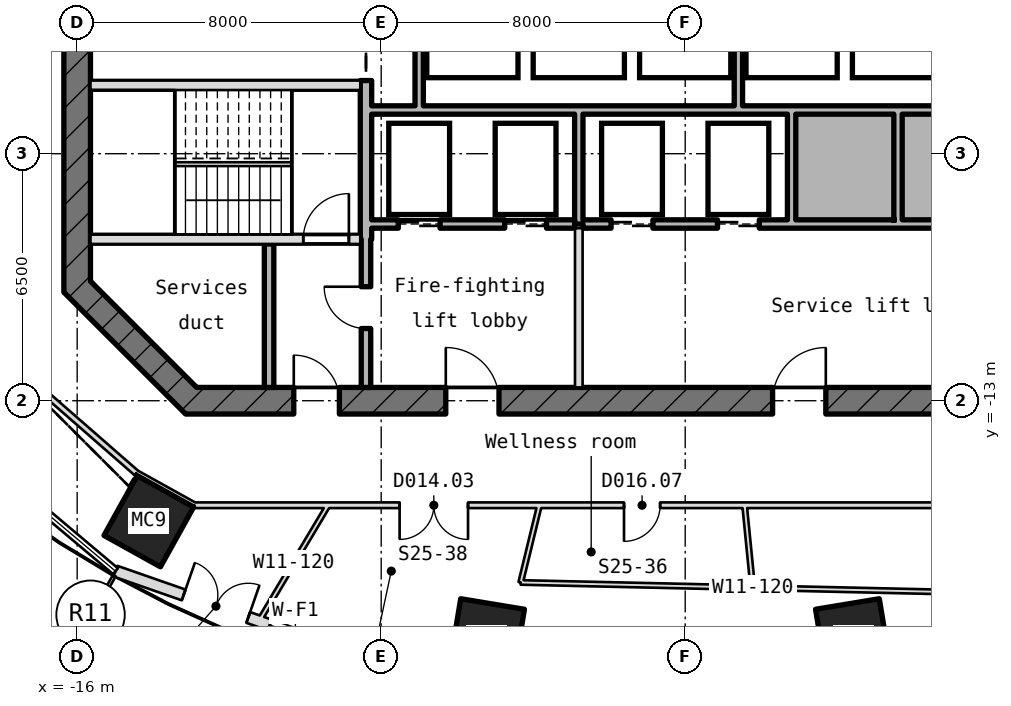
"""IFC4 building model, lengths in metres.
Left out: names, types, materials, properties, quantities, classifications, styles, units other than length and angle.
Written with IfcOpenShell. Run it as: python <this file> out.ifc"""

import sys

from ifc_helpers import new_model, si_unit, direction, frame, frame_2d, origin, origin_2d, place, context, subcontext, project, spatial, rectangle, hollow_rectangle, extrude, element, fill, save


model = new_model("IFC4")
c1 = context("Model", 3, precision=1e-05, world=origin(), true_north=direction((0.0, 1.0)))
c2 = subcontext(c1, "Body", "Model", "MODEL_VIEW")
j1 = project(units=[si_unit("LENGTHUNIT", "METRE"), si_unit("PLANEANGLEUNIT", "RADIAN")], contexts=[c1])
p1 = place(None, origin())
s1 = spatial("IfcSite", under=j1, at=p1, CompositionType="ELEMENT")
p2 = place(p1, origin())
s2 = spatial("IfcBuilding", under=s1, at=p2, CompositionType="ELEMENT")
p3 = place(p2, frame((0.0, 0.0, 359.2)))
s3 = spatial("IfcBuildingStorey", under=s2, at=p3, CompositionType="ELEMENT", Elevation=359.2)
for number, where, z_axis, x_axis in (
    (1, (-14.114, -16.171, -0.18), (0.0, 0.0, 1.0), (-0.874, 0.486, 0.0)),
    (2, (-5.216, -19.237, -0.18), (0.0, 0.0, 1.0), (-0.987, 0.163, 0.0)),
    (3, (4.416, -19.237, -0.18), (0.0, 0.0, 1.0), (-0.987, -0.163, 0.0)),
):
    element("IfcColumn", number, at=place(p3, frame(where, z_axis=z_axis, x_axis=x_axis)), inside=s3, PredefinedType="COLUMN", context=c2, shape_type="SweptSolid", body=[
        extrude(hollow_rectangle(XDim=1.7, YDim=1.8, WallThickness=0.05, at=origin_2d()), origin(), (0.0, 0.0, 1.0), 4.15),
    ])
p4 = place(p3, frame((-14.992, -17.485, 0.0), z_axis=(0.0, 0.0, 1.0), x_axis=(0.944242611416, -0.329250498535, 0.0)))
e4 = element("IfcWall", 4, at=p4, inside=s3, PredefinedType="SOLIDWALL", context=c2, shape_type="SweptSolid", body=[
    extrude(rectangle(XDim=10.027, YDim=0.3, at=frame_2d((5.014, 0.0))), origin(), (0.0, 0.0, 1.0), 3.97),
])
p5 = place(p4, frame((1.9, 0.0, 0.0)))
e5 = element("IfcOpeningElement", 5, at=p5, cuts=e4, PredefinedType="OPENING", context=c2, shape_type="SweptSolid", body=[
    extrude(rectangle(XDim=1.8, YDim=2.4, at=frame_2d((0.9, 1.2))), frame((0.0, 0.16, 0.0), z_axis=(0.0, -1.0, 0.0), x_axis=(1.0, 0.0, 0.0)), (0.0, 0.0, 1.0), 0.32),
])
p6 = place(p4, frame((4.3, 0.0, 0.9)))
e6 = element("IfcOpeningElement", 6, at=p6, cuts=e4, PredefinedType="OPENING", context=c2, shape_type="SweptSolid", body=[
    extrude(rectangle(XDim=1.6, YDim=1.5, at=frame_2d((0.8, 0.75))), frame((0.0, 0.16, 0.0), z_axis=(0.0, -1.0, 0.0), x_axis=(1.0, 0.0, 0.0)), (0.0, 0.0, 1.0), 0.32),
])
p7 = place(p3, frame((4.724, -20.786, 0.0), z_axis=(0.0, 0.0, 1.0), x_axis=(0.944239971919, 0.329258068133, 0.0)))
e7 = element("IfcWall", 7, at=p7, inside=s3, PredefinedType="SOLIDWALL", context=c2, shape_type="SweptSolid", body=[
    extrude(rectangle(XDim=10.027, YDim=0.3, at=frame_2d((5.014, 0.0))), origin(), (0.0, 0.0, 1.0), 3.97),
])
p8 = place(p7, frame((1.9, 0.0, 0.0)))
e8 = element("IfcOpeningElement", 8, at=p8, cuts=e7, PredefinedType="OPENING", context=c2, shape_type="SweptSolid", body=[
    extrude(rectangle(XDim=1.8, YDim=2.4, at=frame_2d((0.9, 1.2))), frame((0.0, 0.16, 0.0), z_axis=(0.0, -1.0, 0.0), x_axis=(1.0, 0.0, 0.0)), (0.0, 0.0, 1.0), 0.32),
])
p9 = place(p7, frame((4.3, 0.0, 0.9)))
e9 = element("IfcOpeningElement", 9, at=p9, cuts=e7, PredefinedType="OPENING", context=c2, shape_type="SweptSolid", body=[
    extrude(rectangle(XDim=1.6, YDim=1.5, at=frame_2d((0.8, 0.75))), frame((0.0, 0.16, 0.0), z_axis=(0.0, -1.0, 0.0), x_axis=(1.0, 0.0, 0.0)), (0.0, 0.0, 1.0), 0.32),
])
p10 = place(p3, frame((-16.0, 10.145, -0.18), z_axis=(0.0, 0.0, 1.0), x_axis=(0.0, -1.0, 0.0)))
e10 = element("IfcWall", 10, at=p10, inside=s3, PredefinedType="SHEAR", context=c2, shape_type="SweptSolid", body=[
    extrude(rectangle(XDim=20.29, YDim=0.7, at=frame_2d((10.145, 0.0))), origin(), (0.0, 0.0, 1.0), 4.15),
])
p11 = place(p10, frame((8.945, 0.0, 0.18)))
e11 = element("IfcOpeningElement", 11, at=p11, cuts=e10, PredefinedType="OPENING", context=c2, shape_type="SweptSolid", body=[
    extrude(rectangle(XDim=2.4, YDim=2.1, at=frame_2d((1.2, 1.05))), frame((0.0, 0.36, 0.0), z_axis=(0.0, -1.0, 0.0), x_axis=(1.0, 0.0, 0.0)), (0.0, 0.0, 1.0), 0.72),
])
p12 = place(p10, frame((5.545, 0.0, 0.18)))
e12 = element("IfcOpeningElement", 12, at=p12, cuts=e10, PredefinedType="OPENING", context=c2, shape_type="SweptSolid", body=[
    extrude(rectangle(XDim=1.2, YDim=2.1, at=frame_2d((0.6, 1.05))), frame((0.0, 0.36, 0.0), z_axis=(0.0, -1.0, 0.0), x_axis=(1.0, 0.0, 0.0)), (0.0, 0.0, 1.0), 0.72),
])
p13 = place(p3, frame((-16.103, -9.897, -0.18), z_axis=(0.0, 0.0, 1.0), x_axis=(0.707106781187, -0.707106781187, 0.0)))
e13 = element("IfcWall", 13, at=p13, inside=s3, PredefinedType="SHEAR", context=c2, shape_type="SweptSolid", body=[
    extrude(rectangle(XDim=4.533, YDim=0.7, at=frame_2d((2.266, 0.0))), origin(), (0.0, 0.0, 1.0), 4.15),
])
p14 = place(p3, frame((-13.145, -13.0, -0.18), z_axis=(0.0, 0.0, 1.0), x_axis=(1.0, 0.0, 0.0)))
e14 = element("IfcWall", 14, at=p14, inside=s3, PredefinedType="SHEAR", context=c2, shape_type="SweptSolid", body=[
    extrude(rectangle(XDim=26.29, YDim=0.7, at=frame_2d((13.145, 0.0))), origin(), (0.0, 0.0, 1.0), 4.15),
])
p15 = place(p14, frame((2.845, 0.0, 0.18)))
e15 = element("IfcOpeningElement", 15, at=p15, cuts=e14, PredefinedType="OPENING", context=c2, shape_type="SweptSolid", body=[
    extrude(rectangle(XDim=1.2, YDim=2.1, at=frame_2d((0.6, 1.05))), frame((0.0, 0.36, 0.0), z_axis=(0.0, -1.0, 0.0), x_axis=(1.0, 0.0, 0.0)), (0.0, 0.0, 1.0), 0.72),
])
p16 = place(p14, frame((6.845, 0.0, 0.18)))
e16 = element("IfcOpeningElement", 16, at=p16, cuts=e14, PredefinedType="OPENING", context=c2, shape_type="SweptSolid", body=[
    extrude(rectangle(XDim=1.4, YDim=2.1, at=frame_2d((0.7, 1.05))), frame((0.0, 0.36, 0.0), z_axis=(0.0, -1.0, 0.0), x_axis=(1.0, 0.0, 0.0)), (0.0, 0.0, 1.0), 0.72),
])
p17 = place(p14, frame((15.445, 0.0, 0.18)))
e17 = element("IfcOpeningElement", 17, at=p17, cuts=e14, PredefinedType="OPENING", context=c2, shape_type="SweptSolid", body=[
    extrude(rectangle(XDim=1.4, YDim=2.1, at=frame_2d((0.7, 1.05))), frame((0.0, 0.36, 0.0), z_axis=(0.0, -1.0, 0.0), x_axis=(1.0, 0.0, 0.0)), (0.0, 0.0, 1.0), 0.72),
])
p18 = place(p3, frame((-15.65, -8.75, -0.18), z_axis=(0.0, 0.0, 1.0), x_axis=(1.0, 0.0, 0.0)))
e18 = element("IfcWall", 18, at=p18, inside=s3, PredefinedType="SHEAR", context=c2, shape_type="SweptSolid", body=[
    extrude(rectangle(XDim=7.1, YDim=0.25, at=frame_2d((3.55, 0.0))), origin(), (0.0, 0.0, 1.0), 4.15),
])
p19 = place(p18, frame((5.6, 0.0, 0.18)))
e19 = element("IfcOpeningElement", 19, at=p19, cuts=e18, PredefinedType="OPENING", context=c2, shape_type="SweptSolid", body=[
    extrude(rectangle(XDim=1.2, YDim=2.1, at=frame_2d((0.6, 1.05))), frame((0.0, 0.135, 0.0), z_axis=(0.0, -1.0, 0.0), x_axis=(1.0, 0.0, 0.0)), (0.0, 0.0, 1.0), 0.27),
])
p20 = place(p3, frame((-8.25, -8.35, 0.0), z_axis=(0.0, 0.0, 1.0), x_axis=(1.0, 0.0, 0.0)))
e20 = element("IfcWall", 20, at=p20, inside=s3, PredefinedType="STANDARD", context=c2, shape_type="SweptSolid", body=[
    extrude(rectangle(XDim=5.34, YDim=0.22, at=frame_2d((2.67, 0.0))), origin(), (0.0, 0.0, 1.0), 3.97),
])
p21 = place(p20, frame((0.7, 0.0, 0.0)))
e21 = element("IfcOpeningElement", 21, at=p21, cuts=e20, PredefinedType="OPENING", context=c2, shape_type="SweptSolid", body=[
    extrude(rectangle(XDim=1.1, YDim=2.1, at=frame_2d((0.55, 1.05))), frame((0.0, 0.12, 0.0), z_axis=(0.0, -1.0, 0.0), x_axis=(1.0, 0.0, 0.0)), (0.0, 0.0, 1.0), 0.24),
])
p22 = place(p20, frame((3.5, 0.0, 0.0)))
e22 = element("IfcOpeningElement", 22, at=p22, cuts=e20, PredefinedType="OPENING", context=c2, shape_type="SweptSolid", body=[
    extrude(rectangle(XDim=1.1, YDim=2.1, at=frame_2d((0.55, 1.05))), frame((0.0, 0.12, 0.0), z_axis=(0.0, -1.0, 0.0), x_axis=(1.0, 0.0, 0.0)), (0.0, 0.0, 1.0), 0.24),
])
p23 = place(p3, frame((-2.69, -8.35, 0.0), z_axis=(0.0, 0.0, 1.0), x_axis=(1.0, 0.0, 0.0)))
e23 = element("IfcWall", 23, at=p23, inside=s3, PredefinedType="STANDARD", context=c2, shape_type="SweptSolid", body=[
    extrude(rectangle(XDim=10.94, YDim=0.22, at=frame_2d((5.47, 0.0))), origin(), (0.0, 0.0, 1.0), 3.97),
])
p24 = place(p23, frame((0.74, 0.0, 0.0)))
e24 = element("IfcOpeningElement", 24, at=p24, cuts=e23, PredefinedType="OPENING", context=c2, shape_type="SweptSolid", body=[
    extrude(rectangle(XDim=1.1, YDim=2.1, at=frame_2d((0.55, 1.05))), frame((0.0, 0.12, 0.0), z_axis=(0.0, -1.0, 0.0), x_axis=(1.0, 0.0, 0.0)), (0.0, 0.0, 1.0), 0.24),
])
p25 = place(p23, frame((3.54, 0.0, 0.0)))
e25 = element("IfcOpeningElement", 25, at=p25, cuts=e23, PredefinedType="OPENING", context=c2, shape_type="SweptSolid", body=[
    extrude(rectangle(XDim=1.1, YDim=2.1, at=frame_2d((0.55, 1.05))), frame((0.0, 0.12, 0.0), z_axis=(0.0, -1.0, 0.0), x_axis=(1.0, 0.0, 0.0)), (0.0, 0.0, 1.0), 0.24),
])
p26 = place(p3, frame((-8.25, -5.35, 0.0), z_axis=(0.0, 0.0, 1.0), x_axis=(1.0, 0.0, 0.0)))
e26 = element("IfcWall", 26, at=p26, inside=s3, PredefinedType="STANDARD", context=c2, shape_type="SweptSolid", body=[
    extrude(rectangle(XDim=16.5, YDim=0.22, at=frame_2d((8.25, 0.0))), origin(), (0.0, 0.0, 1.0), 3.97),
])
p27 = place(p3, frame((-15.65, -4.7, -0.18), z_axis=(0.0, 0.0, 1.0), x_axis=(1.0, 0.0, 0.0)))
e27 = element("IfcWall", 27, at=p27, inside=s3, PredefinedType="SHEAR", context=c2, shape_type="SweptSolid", body=[
    extrude(rectangle(XDim=7.1, YDim=0.25, at=frame_2d((3.55, 0.0))), origin(), (0.0, 0.0, 1.0), 4.15),
])
p28 = place(p3, frame((-10.95, -12.65, 0.0), z_axis=(0.0, 0.0, 1.0), x_axis=(0.0, 1.0, 0.0)))
e28 = element("IfcWall", 28, at=p28, inside=s3, PredefinedType="STANDARD", context=c2, shape_type="SweptSolid", body=[
    extrude(rectangle(XDim=3.775, YDim=0.25, at=frame_2d((1.887, 0.0))), origin(), (0.0, 0.0, 1.0), 3.97),
])
p29 = place(p3, frame((-8.4, -12.65, 0.0), z_axis=(0.0, 0.0, 1.0), x_axis=(0.0, 1.0, 0.0)))
e29 = element("IfcWall", 29, at=p29, inside=s3, PredefinedType="STANDARD", context=c2, shape_type="SweptSolid", body=[
    extrude(rectangle(XDim=3.9, YDim=0.25, at=frame_2d((1.95, 0.0))), origin(), (0.0, 0.0, 1.0), 3.97),
])
p30 = place(p29, frame((1.55, 0.0, 0.0)))
e30 = element("IfcOpeningElement", 30, at=p30, cuts=e29, PredefinedType="OPENING", context=c2, shape_type="SweptSolid", body=[
    extrude(rectangle(XDim=1.1, YDim=2.1, at=frame_2d((0.55, 1.05))), frame((0.0, 0.135, 0.0), z_axis=(0.0, -1.0, 0.0), x_axis=(1.0, 0.0, 0.0)), (0.0, 0.0, 1.0), 0.27),
])
p31 = place(p3, frame((-8.4, -8.75, -0.18), z_axis=(0.0, 0.0, 1.0), x_axis=(0.0, 1.0, 0.0)))
e31 = element("IfcWall", 31, at=p31, inside=s3, PredefinedType="SHEAR", context=c2, shape_type="SweptSolid", body=[
    extrude(rectangle(XDim=4.175, YDim=0.3, at=frame_2d((2.087, 0.0))), origin(), (0.0, 0.0, 1.0), 4.15),
])
p32 = place(p3, frame((-7.0, -5.24, 0.0), z_axis=(0.0, 0.0, 1.0), x_axis=(0.0, 1.0, 0.0)))
e32 = element("IfcWall", 32, at=p32, inside=s3, PredefinedType="STANDARD", context=c2, shape_type="SweptSolid", body=[
    extrude(rectangle(XDim=2.74, YDim=0.22, at=frame_2d((1.37, 0.0))), origin(), (0.0, 0.0, 1.0), 3.97),
])
p33 = place(p3, frame((-2.8, -12.65, 0.0), z_axis=(0.0, 0.0, 1.0), x_axis=(0.0, 1.0, 0.0)))
e33 = element("IfcWall", 33, at=p33, inside=s3, PredefinedType="PARTITIONING", context=c2, shape_type="SweptSolid", body=[
    extrude(rectangle(XDim=4.19, YDim=0.2, at=frame_2d((2.095, 0.0))), origin(), (0.0, 0.0, 1.0), 3.97),
])
p34 = place(p3, frame((-2.8, -8.35, 0.0), z_axis=(0.0, 0.0, 1.0), x_axis=(0.0, 1.0, 0.0)))
e34 = element("IfcWall", 34, at=p34, inside=s3, PredefinedType="STANDARD", context=c2, shape_type="SweptSolid", body=[
    extrude(rectangle(XDim=2.89, YDim=0.22, at=frame_2d((1.445, 0.0))), origin(), (0.0, 0.0, 1.0), 3.97),
])
p35 = place(p3, frame((1.4, -5.24, 0.0), z_axis=(0.0, 0.0, 1.0), x_axis=(0.0, 1.0, 0.0)))
e35 = element("IfcWall", 35, at=p35, inside=s3, PredefinedType="STANDARD", context=c2, shape_type="SweptSolid", body=[
    extrude(rectangle(XDim=2.74, YDim=0.22, at=frame_2d((1.37, 0.0))), origin(), (0.0, 0.0, 1.0), 3.97),
])
for number, where, z_axis, x_axis in (
    (36, (2.8, -8.24, 0.0), (0.0, 0.0, 1.0), (0.0, 1.0, 0.0)),
    (37, (5.6, -8.24, 0.0), (0.0, 0.0, 1.0), (0.0, 1.0, 0.0)),
):
    element("IfcWall", number, at=place(p3, frame(where, z_axis=z_axis, x_axis=x_axis)), inside=s3, PredefinedType="STANDARD", context=c2, shape_type="SweptSolid", body=[
        extrude(rectangle(XDim=2.78, YDim=0.22, at=frame_2d((1.39, 0.0))), origin(), (0.0, 0.0, 1.0), 3.97),
    ])
p36 = place(p3, frame((-14.439, -14.903, 0.0), z_axis=(0.0, 0.0, 1.0), x_axis=(-0.753231723651, 0.657755251204, 0.0)))
e38 = element("IfcWall", 38, at=p36, inside=s3, PredefinedType="PARTITIONING", context=c2, shape_type="SweptSolid", body=[
    extrude(rectangle(XDim=5.723, YDim=0.15, at=frame_2d((2.861, 0.0))), origin(), (0.0, 0.0, 1.0), 3.97),
])
p37 = place(p3, frame((-12.916, -15.75, 0.0), z_axis=(0.0, 0.0, 1.0), x_axis=(-0.87407797583, 0.485785644259, 0.0)))
e39 = element("IfcWall", 39, at=p37, inside=s3, PredefinedType="PARTITIONING", context=c2, shape_type="SweptSolid", body=[
    extrude(rectangle(XDim=1.743, YDim=0.15, at=frame_2d((0.872, 0.0))), origin(), (0.0, 0.0, 1.0), 3.97),
])
p38 = place(p3, frame((-9.395, -15.75, 0.0), z_axis=(0.0, 0.0, 1.0), x_axis=(-0.512250738002, -0.858835945578, 0.0)))
e40 = element("IfcWall", 40, at=p38, inside=s3, PredefinedType="PARTITIONING", context=c2, shape_type="SweptSolid", body=[
    extrude(rectangle(XDim=3.553, YDim=0.12, at=frame_2d((1.776, 0.0))), origin(), (0.0, 0.0, 1.0), 3.97),
])
p39 = place(p3, frame((-4.329, -17.781, 0.0), z_axis=(0.0, 0.0, 1.0), x_axis=(0.999747193502, -0.02248441871, 0.0)))
e41 = element("IfcWall", 41, at=p39, inside=s3, PredefinedType="PARTITIONING", context=c2, shape_type="SweptSolid", body=[
    extrude(rectangle(XDim=12.216, YDim=0.12, at=frame_2d((6.108, 0.0))), origin(), (0.0, 0.0, 1.0), 3.97),
])
p40 = place(p3, frame((-4.329, -17.781, 0.0), z_axis=(0.0, 0.0, 1.0), x_axis=(0.236595923388, 0.971608135534, 0.0)))
e42 = element("IfcWall", 42, at=p40, inside=s3, PredefinedType="PARTITIONING", context=c2, shape_type="SweptSolid", body=[
    extrude(rectangle(XDim=2.091, YDim=0.12, at=frame_2d((1.045, 0.0))), origin(), (0.0, 0.0, 1.0), 3.97),
])
p41 = place(p3, frame((1.778, -17.919, 0.0), z_axis=(0.0, 0.0, 1.0), x_axis=(-0.098694000634, 0.995117829324, 0.0)))
e43 = element("IfcWall", 43, at=p41, inside=s3, PredefinedType="PARTITIONING", context=c2, shape_type="SweptSolid", body=[
    extrude(rectangle(XDim=2.179, YDim=0.12, at=frame_2d((1.09, 0.0))), origin(), (0.0, 0.0, 1.0), 3.97),
])
p42 = place(p3, frame((12.116, -15.75, 0.0), z_axis=(0.0, 0.0, 1.0), x_axis=(-1.0, 0.0, 0.0)))
e44 = element("IfcWall", 44, at=p42, inside=s3, PredefinedType="PARTITIONING", context=c2, shape_type="SweptSolid", body=[
    extrude(rectangle(XDim=25.032, YDim=0.15, at=frame_2d((12.516, 0.0))), origin(), (0.0, 0.0, 1.0), 3.97),
])
p43 = place(p42, frame((12.776, 0.0, 0.0)))
e45 = element("IfcOpeningElement", 45, at=p43, cuts=e44, PredefinedType="OPENING", context=c2, shape_type="SweptSolid", body=[
    extrude(rectangle(XDim=0.95, YDim=2.1, at=frame_2d((0.475, 1.05))), frame((0.0, 0.085, 0.0), z_axis=(0.0, -1.0, 0.0), x_axis=(1.0, 0.0, 0.0)), (0.0, 0.0, 1.0), 0.17),
])
p44 = place(p42, frame((17.831, 0.0, 0.0)))
e46 = element("IfcOpeningElement", 46, at=p44, cuts=e44, PredefinedType="OPENING", context=c2, shape_type="SweptSolid", body=[
    extrude(rectangle(XDim=1.8, YDim=2.1, at=frame_2d((0.9, 1.05))), frame((0.0, 0.085, 0.0), z_axis=(0.0, -1.0, 0.0), x_axis=(1.0, 0.0, 0.0)), (0.0, 0.0, 1.0), 0.17),
])
p45 = place(p5, origin())
e47 = element("IfcDoor", 47, at=p45, inside=s3, OperationType="SINGLE_SWING_LEFT", PredefinedType="DOOR", context=c2, shape_type="SweptSolid", body=[
    extrude(rectangle(XDim=1.8, YDim=2.4, at=frame_2d((0.9, 1.2))), frame((0.0, 0.025, 0.0), z_axis=(0.0, -1.0, 0.0), x_axis=(1.0, 0.0, 0.0)), (0.0, 0.0, 1.0), 0.05),
])
fill(e5, e47)
p46 = place(p6, origin())
e48 = element("IfcWindow", 48, at=p46, inside=s3, PartitioningType="SINGLE_PANEL", PredefinedType="WINDOW", context=c2, shape_type="SweptSolid", body=[
    extrude(rectangle(XDim=1.6, YDim=1.5, at=frame_2d((0.8, 0.75))), frame((0.0, 0.03, 0.0), z_axis=(0.0, -1.0, 0.0), x_axis=(1.0, 0.0, 0.0)), (0.0, 0.0, 1.0), 0.06),
])
fill(e6, e48)
p47 = place(p21, origin())
e49 = element("IfcDoor", 49, at=p47, inside=s3, OperationType="DOUBLE_DOOR_SLIDING", PredefinedType="DOOR", context=c2, shape_type="SweptSolid", body=[
    extrude(rectangle(XDim=1.1, YDim=2.1, at=frame_2d((0.55, 1.05))), frame((0.0, 0.025, 0.0), z_axis=(0.0, -1.0, 0.0), x_axis=(1.0, 0.0, 0.0)), (0.0, 0.0, 1.0), 0.05),
])
fill(e21, e49)
p48 = place(p22, origin())
e50 = element("IfcDoor", 50, at=p48, inside=s3, OperationType="DOUBLE_DOOR_SLIDING", PredefinedType="DOOR", context=c2, shape_type="SweptSolid", body=[
    extrude(rectangle(XDim=1.1, YDim=2.1, at=frame_2d((0.55, 1.05))), frame((0.0, 0.025, 0.0), z_axis=(0.0, -1.0, 0.0), x_axis=(1.0, 0.0, 0.0)), (0.0, 0.0, 1.0), 0.05),
])
fill(e22, e50)
p49 = place(p24, origin())
e51 = element("IfcDoor", 51, at=p49, inside=s3, OperationType="DOUBLE_DOOR_SLIDING", PredefinedType="DOOR", context=c2, shape_type="SweptSolid", body=[
    extrude(rectangle(XDim=1.1, YDim=2.1, at=frame_2d((0.55, 1.05))), frame((0.0, 0.025, 0.0), z_axis=(0.0, -1.0, 0.0), x_axis=(1.0, 0.0, 0.0)), (0.0, 0.0, 1.0), 0.05),
])
fill(e24, e51)
p50 = place(p25, origin())
e52 = element("IfcDoor", 52, at=p50, inside=s3, OperationType="DOUBLE_DOOR_SLIDING", PredefinedType="DOOR", context=c2, shape_type="SweptSolid", body=[
    extrude(rectangle(XDim=1.1, YDim=2.1, at=frame_2d((0.55, 1.05))), frame((0.0, 0.025, 0.0), z_axis=(0.0, -1.0, 0.0), x_axis=(1.0, 0.0, 0.0)), (0.0, 0.0, 1.0), 0.05),
])
fill(e25, e52)
p51 = place(p19, origin())
e53 = element("IfcDoor", 53, at=p51, inside=s3, OperationType="SINGLE_SWING_RIGHT", PredefinedType="DOOR", context=c2, shape_type="SweptSolid", body=[
    extrude(rectangle(XDim=1.2, YDim=2.1, at=frame_2d((0.6, 1.05))), frame((0.0, 0.025, 0.0), z_axis=(0.0, -1.0, 0.0), x_axis=(1.0, 0.0, 0.0)), (0.0, 0.0, 1.0), 0.05),
])
fill(e19, e53)
p52 = place(p30, origin())
e54 = element("IfcDoor", 54, at=p52, inside=s3, OperationType="SINGLE_SWING_RIGHT", PredefinedType="DOOR", context=c2, shape_type="SweptSolid", body=[
    extrude(rectangle(XDim=1.1, YDim=2.1, at=frame_2d((0.55, 1.05))), frame((0.0, 0.025, 0.0), z_axis=(0.0, -1.0, 0.0), x_axis=(1.0, 0.0, 0.0)), (0.0, 0.0, 1.0), 0.05),
])
fill(e30, e54)
p53 = place(p15, origin())
e55 = element("IfcDoor", 55, at=p53, inside=s3, OperationType="SINGLE_SWING_RIGHT", PredefinedType="DOOR", context=c2, shape_type="SweptSolid", body=[
    extrude(rectangle(XDim=1.2, YDim=2.1, at=frame_2d((0.6, 1.05))), frame((0.0, 0.025, 0.0), z_axis=(0.0, -1.0, 0.0), x_axis=(1.0, 0.0, 0.0)), (0.0, 0.0, 1.0), 0.05),
])
fill(e15, e55)
p54 = place(p16, origin())
e56 = element("IfcDoor", 56, at=p54, inside=s3, OperationType="SINGLE_SWING_RIGHT", PredefinedType="DOOR", context=c2, shape_type="SweptSolid", body=[
    extrude(rectangle(XDim=1.4, YDim=2.1, at=frame_2d((0.7, 1.05))), frame((0.0, 0.025, 0.0), z_axis=(0.0, -1.0, 0.0), x_axis=(1.0, 0.0, 0.0)), (0.0, 0.0, 1.0), 0.05),
])
fill(e16, e56)
p55 = place(p17, origin())
e57 = element("IfcDoor", 57, at=p55, inside=s3, OperationType="SINGLE_SWING_RIGHT", PredefinedType="DOOR", context=c2, shape_type="SweptSolid", body=[
    extrude(rectangle(XDim=1.4, YDim=2.1, at=frame_2d((0.7, 1.05))), frame((0.0, 0.025, 0.0), z_axis=(0.0, -1.0, 0.0), x_axis=(1.0, 0.0, 0.0)), (0.0, 0.0, 1.0), 0.05),
])
fill(e17, e57)
p56 = place(p43, origin())
e58 = element("IfcDoor", 58, at=p56, inside=s3, OperationType="SINGLE_SWING_RIGHT", PredefinedType="DOOR", context=c2, shape_type="SweptSolid", body=[
    extrude(rectangle(XDim=0.95, YDim=2.1, at=frame_2d((0.475, 1.05))), frame((0.0, 0.025, 0.0), z_axis=(0.0, -1.0, 0.0), x_axis=(1.0, 0.0, 0.0)), (0.0, 0.0, 1.0), 0.05),
])
fill(e45, e58)
p57 = place(p44, origin())
e59 = element("IfcDoor", 59, at=p57, inside=s3, OperationType="DOUBLE_DOOR_SINGLE_SWING", PredefinedType="DOOR", context=c2, shape_type="SweptSolid", body=[
    extrude(rectangle(XDim=1.8, YDim=2.1, at=frame_2d((0.9, 1.05))), frame((0.0, 0.025, 0.0), z_axis=(0.0, -1.0, 0.0), x_axis=(1.0, 0.0, 0.0)), (0.0, 0.0, 1.0), 0.05),
])
fill(e46, e59)
save(model, sys.argv[1])
